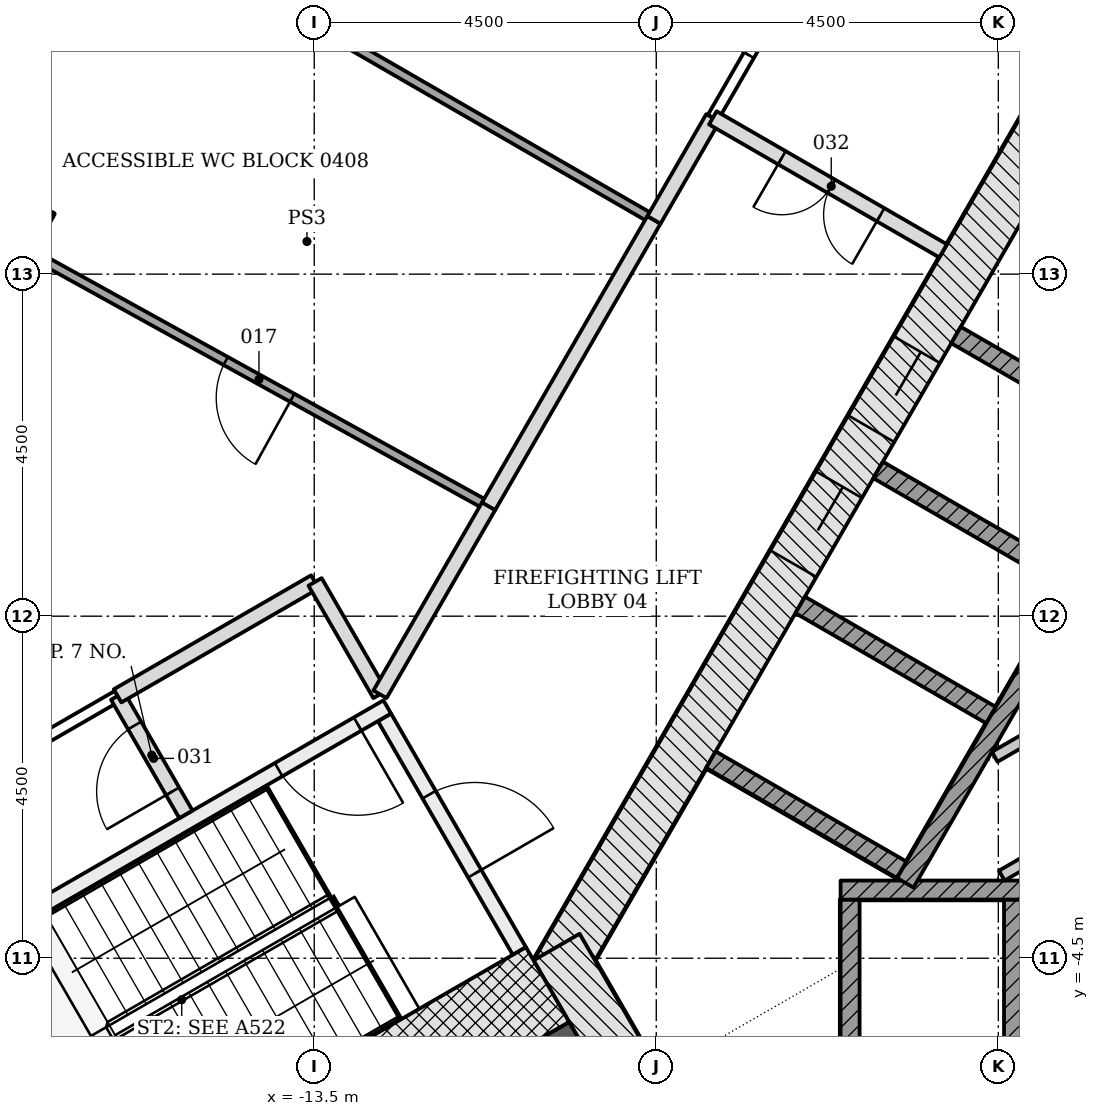
"""IFC4 building model, lengths in metres.
Left out: names, types, materials, properties, quantities, classifications, styles, units other than length and angle.
Written with IfcOpenShell. Run it as: python <this file> out.ifc"""

import sys

from ifc_helpers import new_model, si_unit, direction, frame, frame_2d, origin, origin_2d, place, context, subcontext, project, spatial, polyline, rectangle, outline, extrude, element, fill, save


model = new_model("IFC4")
c1 = context("Model", 3, precision=1e-05, world=origin(), true_north=direction((0.0, 1.0)))
c2 = subcontext(c1, "Body", "Model", "MODEL_VIEW")
j1 = project(units=[si_unit("LENGTHUNIT", "METRE"), si_unit("PLANEANGLEUNIT", "RADIAN")], contexts=[c1])
p1 = place(None, origin())
s1 = spatial("IfcSite", under=j1, at=p1, CompositionType="ELEMENT")
p2 = place(p1, origin())
s2 = spatial("IfcBuilding", under=s1, at=p2, CompositionType="ELEMENT")
p3 = place(p2, frame((0.0, 0.0, 19.5)))
s3 = spatial("IfcBuildingStorey", under=s2, at=p3, CompositionType="ELEMENT", Elevation=19.5)
p4 = place(p3, frame((-17.739, 5.058, -0.25), z_axis=(0.0, 0.0, 1.0), x_axis=(-0.875152760281, 0.483846717641, 0.0)))
e1 = element("IfcColumn", 1, at=p4, inside=s3, PredefinedType="COLUMN", context=c2, shape_type="SweptSolid", body=[
    extrude(rectangle(XDim=1.2, YDim=1.2, at=origin_2d()), origin(), (0.0, 0.0, 1.0), 4.55),
])
p5 = place(p3, frame((-1.083, 11.281, -0.25), z_axis=(0.0, 0.0, 1.0), x_axis=(-0.500001446645, -0.866024568562, 0.0)))
e2 = element("IfcWall", 2, at=p5, inside=s3, PredefinedType="SHEAR", context=c2, shape_type="SweptSolid", body=[
    extrude(rectangle(XDim=18.458, YDim=0.7, at=frame_2d((9.229, 0.0))), origin(), (0.0, 0.0, 1.0), 4.55),
])
p6 = place(p5, frame((8.979, 0.0, 0.25)))
e3 = element("IfcOpeningElement", 3, at=p6, cuts=e2, PredefinedType="OPENING", context=c2, shape_type="SweptSolid", body=[
    extrude(rectangle(XDim=1.2, YDim=2.1, at=frame_2d((0.6, 1.05))), frame((0.0, 0.36, 0.0), z_axis=(0.0, -1.0, 0.0), x_axis=(1.0, 0.0, 0.0)), (0.0, 0.0, 1.0), 0.72),
])
p7 = place(p5, frame((11.029, 0.0, 0.25)))
e4 = element("IfcOpeningElement", 4, at=p7, cuts=e2, PredefinedType="OPENING", context=c2, shape_type="SweptSolid", body=[
    extrude(rectangle(XDim=1.2, YDim=2.1, at=frame_2d((0.6, 1.05))), frame((0.0, 0.36, 0.0), z_axis=(0.0, -1.0, 0.0), x_axis=(1.0, 0.0, 0.0)), (0.0, 0.0, 1.0), 0.72),
])
p8 = place(p3, frame((-10.311, -4.353, -0.25), z_axis=(0.0, 0.0, 1.0), x_axis=(0.500042739161, -0.866000726912, 0.0)))
e5 = element("IfcWall", 5, at=p8, inside=s3, PredefinedType="SHEAR", context=c2, shape_type="SweptSolid", body=[
    extrude(rectangle(XDim=2.771, YDim=0.7, at=frame_2d((1.386, 0.0))), origin(), (0.0, 0.0, 1.0), 4.55),
])
p9 = place(p3, frame((-9.922, -5.728, -0.25), z_axis=(0.0, 0.0, 1.0), x_axis=(-0.866028046028, -0.499995423472, 0.0)))
e6 = element("IfcWall", 6, at=p9, inside=s3, PredefinedType="SHEAR", context=c2, shape_type="SweptSolid", body=[
    extrude(rectangle(XDim=14.633, YDim=0.9, at=frame_2d((7.316, 0.0))), origin(), (0.0, 0.0, 1.0), 4.55),
])
p10 = place(p9, frame((7.35, 0.0, 0.25)))
e7 = element("IfcOpeningElement", 7, at=p10, cuts=e6, PredefinedType="OPENING", context=c2, shape_type="SweptSolid", body=[
    extrude(rectangle(XDim=1.5, YDim=2.1, at=frame_2d((0.75, 1.05))), frame((0.0, 0.46, 0.0), z_axis=(0.0, -1.0, 0.0), x_axis=(1.0, 0.0, 0.0)), (0.0, 0.0, 1.0), 0.92),
])
for number, where, z_axis, x_axis in (
    (8, (-6.45, -6.228, -0.25), (0.0, 0.0, 1.0), (0.0, 1.0, 0.0)),
    (9, (-4.3, -6.228, -0.25), (0.0, 0.0, 1.0), (0.0, 1.0, 0.0)),
):
    element("IfcWall", number, at=place(p3, frame(where, z_axis=z_axis, x_axis=x_axis)), inside=s3, PredefinedType="PARTITIONING", context=c2, shape_type="SweptSolid", body=[
        extrude(rectangle(XDim=2.5, YDim=0.25, at=frame_2d((1.25, 0.0))), origin(), (0.0, 0.0, 1.0), 4.55),
    ])
p11 = place(p3, frame((-6.575, -3.603, 0.0), z_axis=(0.0, 0.0, 1.0), x_axis=(1.0, 0.0, 0.0)))
e10 = element("IfcWall", 10, at=p11, inside=s3, PredefinedType="PARTITIONING", context=c2, shape_type="SweptSolid", body=[
    extrude(rectangle(XDim=13.15, YDim=0.25, at=frame_2d((6.575, 0.0))), origin(), (0.0, 0.0, 1.0), 4.3),
])
for number, where, z_axis, x_axis in (
    (11, (-5.056, 3.699, -0.25), (0.0, 0.0, 1.0), (0.866, -0.5, 0.0)),
    (12, (-6.081, 1.923, -0.25), (0.0, 0.0, 1.0), (0.866, -0.5, 0.0)),
    (13, (-7.106, 0.148, -0.25), (0.0, 0.0, 1.0), (0.866, -0.5, 0.0)),
    (14, (-8.281, -1.887, -0.25), (0.0, 0.0, 1.0), (0.866, -0.5, 0.0)),
):
    element("IfcWall", number, at=place(p3, frame(where, z_axis=z_axis, x_axis=x_axis)), inside=s3, PredefinedType="PARTITIONING", context=c2, shape_type="SweptSolid", body=[
        extrude(rectangle(XDim=2.9, YDim=0.25, at=frame_2d((1.45, 0.0))), origin(), (0.0, 0.0, 1.0), 4.55),
    ])
p12 = place(p3, frame((0.176, 6.711, 0.0), z_axis=(0.0, 0.0, 1.0), x_axis=(-0.500004227369, -0.866022963098, 0.0)))
e15 = element("IfcWall", 15, at=p12, inside=s3, PredefinedType="PARTITIONING", context=c2, shape_type="SweptSolid", body=[
    extrude(rectangle(XDim=11.8, YDim=0.25, at=frame_2d((5.9, 0.0))), origin(), (0.0, 0.0, 1.0), 4.3),
])
p13 = place(p3, frame((-4.548, -1.851, 0.0), z_axis=(0.0, 0.0, 1.0), x_axis=(0.866023939251, 0.500002536638, 0.0)))
e16 = element("IfcWall", 16, at=p13, inside=s3, PredefinedType="PARTITIONING", context=c2, shape_type="SweptSolid", body=[
    extrude(rectangle(XDim=11.092, YDim=0.15, at=frame_2d((5.546, 0.0))), origin(), (0.0, 0.0, 1.0), 4.3),
])
p14 = place(p13, frame((3.497, 0.0, 0.0)))
e17 = element("IfcOpeningElement", 17, at=p14, cuts=e16, PredefinedType="OPENING", context=c2, shape_type="SweptSolid", body=[
    extrude(rectangle(XDim=0.9, YDim=2.1, at=frame_2d((0.45, 1.05))), frame((0.0, 0.085, 0.0), z_axis=(0.0, -1.0, 0.0), x_axis=(1.0, 0.0, 0.0)), (0.0, 0.0, 1.0), 0.17),
])
p15 = place(p3, frame((-4.454, -3.413, 0.0), z_axis=(0.0, 0.0, 1.0), x_axis=(0.86603043987, 0.499991277142, 0.0)))
e18 = element("IfcWall", 18, at=p15, inside=s3, PredefinedType="PARTITIONING", context=c2, shape_type="SweptSolid", body=[
    extrude(rectangle(XDim=11.792, YDim=0.15, at=frame_2d((5.896, 0.0))), origin(), (0.0, 0.0, 1.0), 4.3),
])
p16 = place(p15, frame((3.847, 0.0, 0.0)))
e19 = element("IfcOpeningElement", 19, at=p16, cuts=e18, PredefinedType="OPENING", context=c2, shape_type="SweptSolid", body=[
    extrude(rectangle(XDim=0.9, YDim=2.1, at=frame_2d((0.45, 1.05))), frame((0.0, 0.085, 0.0), z_axis=(0.0, -1.0, 0.0), x_axis=(1.0, 0.0, 0.0)), (0.0, 0.0, 1.0), 0.17),
])
p17 = place(p3, frame((-12.576, -1.331, -0.25), z_axis=(0.0, 0.0, 1.0), x_axis=(0.499970499736, -0.8660424351, 0.0)))
e20 = element("IfcWall", 20, at=p17, inside=s3, PredefinedType="SHEAR", context=c2, shape_type="SweptSolid", body=[
    extrude(rectangle(XDim=3.55, YDim=0.2, at=frame_2d((1.775, 0.0))), origin(), (0.0, 0.0, 1.0), 4.55),
])
p18 = place(p17, frame((1.175, 0.0, 0.25)))
e21 = element("IfcOpeningElement", 21, at=p18, cuts=e20, PredefinedType="OPENING", context=c2, shape_type="SweptSolid", body=[
    extrude(rectangle(XDim=1.2, YDim=2.1, at=frame_2d((0.6, 1.05))), frame((0.0, 0.11, 0.0), z_axis=(0.0, -1.0, 0.0), x_axis=(1.0, 0.0, 0.0)), (0.0, 0.0, 1.0), 0.22),
])
p19 = place(p3, frame((-12.539, -1.194, -0.25), z_axis=(0.0, 0.0, 1.0), x_axis=(-0.866045472092, -0.499965239061, 0.0)))
e22 = element("IfcWall", 22, at=p19, inside=s3, PredefinedType="SHEAR", context=c2, shape_type="SweptSolid", body=[
    extrude(rectangle(XDim=5.6, YDim=0.2, at=frame_2d((2.8, 0.0))), origin(), (0.0, 0.0, 1.0), 4.55),
])
p20 = place(p19, frame((0.45, 0.0, 0.25)))
e23 = element("IfcOpeningElement", 23, at=p20, cuts=e22, PredefinedType="OPENING", context=c2, shape_type="SweptSolid", body=[
    extrude(rectangle(XDim=1.2, YDim=2.1, at=frame_2d((0.6, 1.05))), frame((0.0, 0.11, 0.0), z_axis=(0.0, -1.0, 0.0), x_axis=(1.0, 0.0, 0.0)), (0.0, 0.0, 1.0), 0.22),
])
p21 = place(p3, frame((-10.43, -4.847, -0.25), z_axis=(0.0, 0.0, 1.0), x_axis=(-0.866018442252, -0.500012057535, 0.0)))
e24 = element("IfcWall", 24, at=p21, inside=s3, PredefinedType="SHEAR", context=c2, shape_type="SweptSolid", body=[
    extrude(rectangle(XDim=7.2, YDim=1.136, at=frame_2d((3.6, 0.0))), origin(), (0.0, 0.0, 1.0), 4.55),
])
p22 = place(p3, frame((0.0, 0.0, -0.25)))
e25 = element("IfcWall", 25, at=p22, inside=s3, PredefinedType="SHEAR", context=c2, shape_type="SweptSolid", body=[
    extrude(outline(polyline([(-17.439, -3.907), (-18.025, -6.093), (-16.95, -7.955), (-16.777, -7.855), (-17.81, -6.065), (-17.267, -4.039), (-17.339, -4.081), (-17.339, -4.081), (-17.339, -4.081), (-17.339, -4.081), (-17.339, -4.081), (-17.339, -4.081), (-17.339, -4.081), (-17.339, -4.081), (-17.339, -4.081), (-17.339, -4.081), (-17.339, -4.081), (-17.339, -4.081), (-17.339, -4.081), (-17.339, -4.081), (-17.339, -4.081), (-17.339, -4.081), (-17.339, -4.081), (-17.439, -3.907)])), origin(), (0.0, 0.0, 1.0), 4.55),
])
p23 = place(p3, frame((-16.087, -1.049, 0.0), z_axis=(0.0, 0.0, 1.0), x_axis=(-0.866071706002, -0.49991979363, 0.0)))
e26 = element("IfcWall", 26, at=p23, inside=s3, PredefinedType="PARTITIONING", context=c2, shape_type="SweptSolid", body=[
    extrude(rectangle(XDim=5.105, YDim=0.15, at=frame_2d((2.552, 0.0))), origin(), (0.0, 0.0, 1.0), 3.894),
])
p24 = place(p23, frame((1.65, 0.0, 0.0)))
e27 = element("IfcOpeningElement", 27, at=p24, cuts=e26, PredefinedType="OPENING", context=c2, shape_type="SweptSolid", body=[
    extrude(rectangle(XDim=1.8, YDim=2.1, at=frame_2d((0.9, 1.05))), frame((0.0, 0.085, 0.0), z_axis=(0.0, -1.0, 0.0), x_axis=(1.0, 0.0, 0.0)), (0.0, 0.0, 1.0), 0.17),
])
p25 = place(p3, frame((-15.188, -2.607, 0.0), z_axis=(0.0, 0.0, 1.0), x_axis=(-0.500024172624, 0.866011447264, 0.0)))
e28 = element("IfcWall", 28, at=p25, inside=s3, PredefinedType="PARTITIONING", context=c2, shape_type="SweptSolid", body=[
    extrude(rectangle(XDim=1.798, YDim=0.2, at=frame_2d((0.899, 0.0))), origin(), (0.0, 0.0, 1.0), 4.3),
])
p26 = place(p25, frame((0.35, 0.0, 0.0)))
e29 = element("IfcOpeningElement", 29, at=p26, cuts=e28, PredefinedType="OPENING", context=c2, shape_type="SweptSolid", body=[
    extrude(rectangle(XDim=1.0, YDim=2.1, at=frame_2d((0.5, 1.05))), frame((0.0, 0.11, 0.0), z_axis=(0.0, -1.0, 0.0), x_axis=(1.0, 0.0, 0.0)), (0.0, 0.0, 1.0), 0.22),
])
p27 = place(p3, frame((-16.087, -1.048, 0.0), z_axis=(0.0, 0.0, 1.0), x_axis=(0.865988915629, 0.500063194015, 0.0)))
e30 = element("IfcWall", 30, at=p27, inside=s3, PredefinedType="PARTITIONING", context=c2, shape_type="SweptSolid", body=[
    extrude(rectangle(XDim=2.998, YDim=0.2, at=frame_2d((1.499, 0.0))), origin(), (0.0, 0.0, 1.0), 3.843),
])
p28 = place(p3, frame((-13.489, 0.451, 0.0), z_axis=(0.0, 0.0, 1.0), x_axis=(0.500044178772, -0.865999895656, 0.0)))
e31 = element("IfcWall", 31, at=p28, inside=s3, PredefinedType="PARTITIONING", context=c2, shape_type="SweptSolid", body=[
    extrude(rectangle(XDim=1.708, YDim=0.2, at=frame_2d((0.854, 0.0))), origin(), (0.0, 0.0, 1.0), 4.3),
])
p29 = place(p3, frame((-12.635, -1.028, 0.0), z_axis=(0.0, 0.0, 1.0), x_axis=(0.50005725472, 0.865992345233, 0.0)))
e32 = element("IfcWall", 32, at=p29, inside=s3, PredefinedType="PARTITIONING", context=c2, shape_type="SweptSolid", body=[
    extrude(rectangle(XDim=2.862, YDim=0.2, at=frame_2d((1.431, 0.0))), origin(), (0.0, 0.0, 1.0), 3.698),
])
p30 = place(p3, frame((-11.208, 1.446, 0.0), z_axis=(0.0, 0.0, 1.0), x_axis=(-0.875125393946, 0.483896212912, 0.0)))
e33 = element("IfcWall", 33, at=p30, inside=s3, PredefinedType="PARTITIONING", context=c2, shape_type="SweptSolid", body=[
    extrude(rectangle(XDim=6.863, YDim=0.12, at=frame_2d((3.432, 0.0))), origin(), (0.0, 0.0, 1.0), 3.698),
])
p31 = place(p30, frame((2.95, 0.0, 0.0)))
e34 = element("IfcOpeningElement", 34, at=p31, cuts=e33, PredefinedType="OPENING", context=c2, shape_type="SweptSolid", body=[
    extrude(rectangle(XDim=1.0, YDim=2.1, at=frame_2d((0.5, 1.05))), frame((0.0, 0.07, 0.0), z_axis=(0.0, -1.0, 0.0), x_axis=(1.0, 0.0, 0.0)), (0.0, 0.0, 1.0), 0.14),
])
p32 = place(p3, frame((-9.031, 5.213, 0.0), z_axis=(0.0, 0.0, 1.0), x_axis=(-0.500044734646, -0.865999574684, 0.0)))
e35 = element("IfcWall", 35, at=p32, inside=s3, PredefinedType="PARTITIONING", context=c2, shape_type="SweptSolid", body=[
    extrude(rectangle(XDim=4.35, YDim=0.2, at=frame_2d((2.175, 0.0))), origin(), (0.0, 0.0, 1.0), 3.688),
])
p33 = place(p3, frame((-8.256, 6.555, 0.0), z_axis=(0.0, 0.0, 1.0), x_axis=(-0.499904469662, -0.866080551226, 0.0)))
e36 = element("IfcWall", 36, at=p33, inside=s3, PredefinedType="PARTITIONING", context=c2, shape_type="SweptSolid", body=[
    extrude(rectangle(XDim=1.548, YDim=0.2, at=frame_2d((0.774, 0.0))), origin(), (0.0, 0.0, 1.0), 3.688),
])
p34 = place(p3, frame((-5.226, 4.806, 0.0), z_axis=(0.0, 0.0, 1.0), x_axis=(-0.865949687125, 0.500131122175, 0.0)))
e37 = element("IfcWall", 37, at=p34, inside=s3, PredefinedType="PARTITIONING", context=c2, shape_type="SweptSolid", body=[
    extrude(rectangle(XDim=3.499, YDim=0.2, at=frame_2d((1.75, 0.0))), origin(), (0.0, 0.0, 1.0), 4.3),
])
p35 = place(p34, frame((0.95, 0.0, 0.0)))
e38 = element("IfcOpeningElement", 38, at=p35, cuts=e37, PredefinedType="OPENING", context=c2, shape_type="SweptSolid", body=[
    extrude(rectangle(XDim=1.5, YDim=2.1, at=frame_2d((0.75, 1.05))), frame((0.0, 0.11, 0.0), z_axis=(0.0, -1.0, 0.0), x_axis=(1.0, 0.0, 0.0)), (0.0, 0.0, 1.0), 0.22),
])
p36 = place(p3, frame((-9.032, 5.214, 0.0), z_axis=(0.0, 0.0, 1.0), x_axis=(-0.866038805516, 0.499976786802, 0.0)))
e39 = element("IfcWall", 39, at=p36, inside=s3, PredefinedType="PARTITIONING", context=c2, shape_type="SweptSolid", body=[
    extrude(rectangle(XDim=4.598, YDim=0.12, at=frame_2d((2.299, 0.0))), origin(), (0.0, 0.0, 1.0), 3.688),
])
p37 = place(p3, frame((-8.256, 6.558, 0.0), z_axis=(0.0, 0.0, 1.0), x_axis=(0.500081734942, 0.86597820895, 0.0)))
e40 = element("IfcWall", 40, at=p37, inside=s3, PredefinedType="PARTITIONING", context=c2, shape_type="SweptSolid", body=[
    extrude(rectangle(XDim=2.804, YDim=0.15, at=frame_2d((1.402, 0.0))), origin(), (0.0, 0.0, 1.0), 3.698),
])
p38 = place(p37, frame((0.95, 0.0, 0.0)))
e41 = element("IfcOpeningElement", 41, at=p38, cuts=e40, PredefinedType="OPENING", context=c2, shape_type="SweptSolid", body=[
    extrude(rectangle(XDim=1.0, YDim=2.1, at=frame_2d((0.5, 1.05))), frame((0.0, 0.085, 0.0), z_axis=(0.0, -1.0, 0.0), x_axis=(1.0, 0.0, 0.0)), (0.0, 0.0, 1.0), 0.17),
])
p39 = place(p6, origin())
e42 = element("IfcDoor", 42, at=p39, inside=s3, OperationType="DOUBLE_DOOR_SLIDING", PredefinedType="DOOR", context=c2, shape_type="SweptSolid", body=[
    extrude(rectangle(XDim=1.2, YDim=2.1, at=frame_2d((0.6, 1.05))), frame((0.0, 0.025, 0.0), z_axis=(0.0, -1.0, 0.0), x_axis=(1.0, 0.0, 0.0)), (0.0, 0.0, 1.0), 0.05),
])
fill(e3, e42)
p40 = place(p7, origin())
e43 = element("IfcDoor", 43, at=p40, inside=s3, OperationType="DOUBLE_DOOR_SLIDING", PredefinedType="DOOR", context=c2, shape_type="SweptSolid", body=[
    extrude(rectangle(XDim=1.2, YDim=2.1, at=frame_2d((0.6, 1.05))), frame((0.0, 0.025, 0.0), z_axis=(0.0, -1.0, 0.0), x_axis=(1.0, 0.0, 0.0)), (0.0, 0.0, 1.0), 0.05),
])
fill(e4, e43)
p41 = place(p18, origin())
e44 = element("IfcDoor", 44, at=p41, inside=s3, OperationType="SINGLE_SWING_RIGHT", PredefinedType="DOOR", context=c2, shape_type="SweptSolid", body=[
    extrude(rectangle(XDim=1.2, YDim=2.1, at=frame_2d((0.6, 1.05))), frame((0.0, 0.025, 0.0), z_axis=(0.0, -1.0, 0.0), x_axis=(1.0, 0.0, 0.0)), (0.0, 0.0, 1.0), 0.05),
])
fill(e21, e44)
p42 = place(p20, origin())
e45 = element("IfcDoor", 45, at=p42, inside=s3, OperationType="SINGLE_SWING_LEFT", PredefinedType="DOOR", context=c2, shape_type="SweptSolid", body=[
    extrude(rectangle(XDim=1.2, YDim=2.1, at=frame_2d((0.6, 1.05))), frame((0.0, 0.025, 0.0), z_axis=(0.0, -1.0, 0.0), x_axis=(1.0, 0.0, 0.0)), (0.0, 0.0, 1.0), 0.05),
])
fill(e23, e45)
p43 = place(p31, origin())
e46 = element("IfcDoor", 46, at=p43, inside=s3, OperationType="SINGLE_SWING_LEFT", PredefinedType="DOOR", context=c2, shape_type="SweptSolid", body=[
    extrude(rectangle(XDim=1.0, YDim=2.1, at=frame_2d((0.5, 1.05))), frame((0.0, 0.025, 0.0), z_axis=(0.0, -1.0, 0.0), x_axis=(1.0, 0.0, 0.0)), (0.0, 0.0, 1.0), 0.05),
])
fill(e34, e46)
p44 = place(p38, origin())
e47 = element("IfcDoor", 47, at=p44, inside=s3, OperationType="SINGLE_SWING_RIGHT", PredefinedType="DOOR", context=c2, shape_type="SweptSolid", body=[
    extrude(rectangle(XDim=1.0, YDim=2.1, at=frame_2d((0.5, 1.05))), frame((0.0, 0.025, 0.0), z_axis=(0.0, -1.0, 0.0), x_axis=(1.0, 0.0, 0.0)), (0.0, 0.0, 1.0), 0.05),
])
fill(e41, e47)
p45 = place(p26, origin())
e48 = element("IfcDoor", 48, at=p45, inside=s3, OperationType="SINGLE_SWING_LEFT", PredefinedType="DOOR", context=c2, shape_type="SweptSolid", body=[
    extrude(rectangle(XDim=1.0, YDim=2.1, at=frame_2d((0.5, 1.05))), frame((0.0, 0.025, 0.0), z_axis=(0.0, -1.0, 0.0), x_axis=(1.0, 0.0, 0.0)), (0.0, 0.0, 1.0), 0.05),
])
fill(e29, e48)
p46 = place(p35, origin())
e49 = element("IfcDoor", 49, at=p46, inside=s3, OperationType="DOUBLE_DOOR_SINGLE_SWING", PredefinedType="DOOR", context=c2, shape_type="SweptSolid", body=[
    extrude(rectangle(XDim=1.5, YDim=2.1, at=frame_2d((0.75, 1.05))), frame((0.0, 0.025, 0.0), z_axis=(0.0, -1.0, 0.0), x_axis=(1.0, 0.0, 0.0)), (0.0, 0.0, 1.0), 0.05),
])
fill(e38, e49)
save(model, sys.argv[1])
